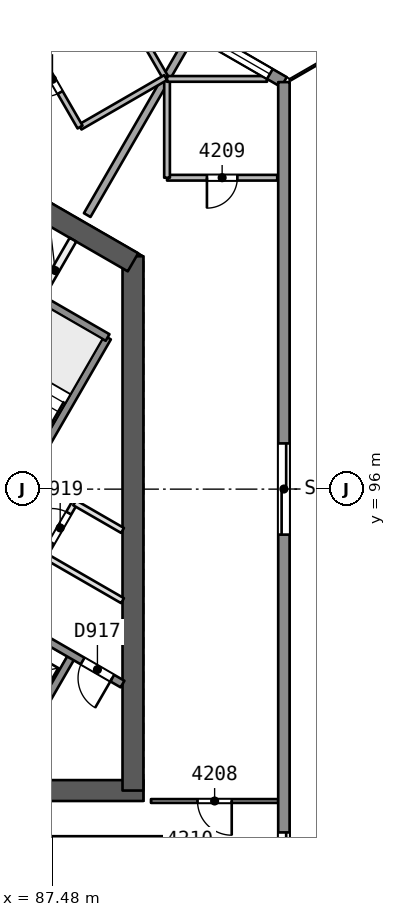
"""IFC4 building model, lengths in metres.
Left out: names, types, materials, properties, quantities, classifications, styles, units other than length and angle.
Written with IfcOpenShell. Run it as: python <this file> out.ifc"""

import sys

from ifc_helpers import new_model, si_unit, direction, frame, frame_2d, origin, place, context, subcontext, project, spatial, rectangle, extrude, element, fill, save


model = new_model("IFC4")
c1 = context("Model", 3, precision=1e-05, world=origin(), true_north=direction((0.0, 1.0)))
c2 = subcontext(c1, "Body", "Model", "MODEL_VIEW")
j1 = project(units=[si_unit("LENGTHUNIT", "METRE"), si_unit("PLANEANGLEUNIT", "RADIAN")], contexts=[c1])
p1 = place(None, origin())
s1 = spatial("IfcSite", under=j1, at=p1, CompositionType="ELEMENT")
p2 = place(p1, origin())
s2 = spatial("IfcBuilding", under=s1, at=p2, CompositionType="ELEMENT")
p3 = place(p2, frame((0.0, 0.0, 174.8)))
s3 = spatial("IfcBuildingStorey", under=s2, at=p3, CompositionType="ELEMENT", Elevation=174.8)
p4 = place(p3, frame((79.659, 88.069, 0.0), z_axis=(0.0, 0.0, 1.0), x_axis=(1.0, 0.0, 0.0)))
e1 = element("IfcWall", 1, at=p4, inside=s3, PredefinedType="SHEAR", context=c2, shape_type="SweptSolid", body=[
    extrude(rectangle(XDim=10.221, YDim=0.55, at=frame_2d((5.111, 0.0))), origin(), (0.0, 0.0, 1.0), 3.7),
])
p5 = place(p4, frame((0.791, 0.0, 0.0)))
e2 = element("IfcOpeningElement", 2, at=p5, cuts=e1, PredefinedType="OPENING", context=c2, shape_type="SweptSolid", body=[
    extrude(rectangle(XDim=1.2, YDim=2.1, at=frame_2d((0.6, 1.05))), frame((0.0, 0.286, 0.0), z_axis=(0.0, -1.0, 0.0), x_axis=(1.0, 0.0, 0.0)), (0.0, 0.0, 1.0), 0.571),
])
p6 = place(p3, frame((89.605, 88.069, 0.0), z_axis=(0.0, 0.0, 1.0), x_axis=(0.0, 1.0, 0.0)))
e3 = element("IfcWall", 3, at=p6, inside=s3, PredefinedType="SHEAR", context=c2, shape_type="SweptSolid", body=[
    extrude(rectangle(XDim=14.058, YDim=0.55, at=frame_2d((7.029, 0.0))), origin(), (0.0, 0.0, 1.0), 3.7),
])
p7 = place(p3, frame((89.605, 101.969, 0.0), z_axis=(0.0, 0.0, 1.0), x_axis=(-0.865997833373, 0.500047750313, 0.0)))
e4 = element("IfcWall", 4, at=p7, inside=s3, PredefinedType="SHEAR", context=c2, shape_type="SweptSolid", body=[
    extrude(rectangle(XDim=3.487, YDim=0.55, at=frame_2d((1.743, 0.0))), origin(), (0.0, 0.0, 1.0), 3.7),
])
p8 = place(p3, frame((93.428, 87.794, 0.0), z_axis=(0.0, 0.0, 1.0), x_axis=(-1.0, 0.0, 0.0)))
e5 = element("IfcWall", 5, at=p8, inside=s3, PredefinedType="PARTITIONING", context=c2, shape_type="SweptSolid", body=[
    extrude(rectangle(XDim=3.349, YDim=0.1, at=frame_2d((1.674, 0.0))), origin(), (0.0, 0.0, 1.0), 3.25),
])
p9 = place(p8, frame((1.224, 0.0, 0.0)))
e6 = element("IfcOpeningElement", 6, at=p9, cuts=e5, PredefinedType="OPENING", context=c2, shape_type="SweptSolid", body=[
    extrude(rectangle(XDim=0.9, YDim=2.1, at=frame_2d((0.45, 1.05))), frame((0.0, 0.061, 0.0), z_axis=(0.0, -1.0, 0.0), x_axis=(1.0, 0.0, 0.0)), (0.0, 0.0, 1.0), 0.121),
])
p10 = place(p3, frame((82.1, 86.768, 0.0), z_axis=(0.0, 0.0, 1.0), x_axis=(1.0, 0.0, 0.0)))
e7 = element("IfcWall", 7, at=p10, inside=s3, PredefinedType="PARTITIONING", context=c2, shape_type="SweptSolid", body=[
    extrude(rectangle(XDim=9.0, YDim=0.2, at=frame_2d((4.5, 0.0))), origin(), (0.0, 0.0, 1.0), 3.25),
])
p11 = place(p3, frame((93.402, 104.194, 0.0), z_axis=(0.0, 0.0, 1.0), x_axis=(-1.0, 0.0, 0.0)))
e8 = element("IfcWall", 8, at=p11, inside=s3, PredefinedType="PARTITIONING", context=c2, shape_type="SweptSolid", body=[
    extrude(rectangle(XDim=2.9, YDim=0.15, at=frame_2d((1.45, 0.0))), origin(), (0.0, 0.0, 1.0), 3.25),
])
p12 = place(p11, frame((1.05, 0.0, 0.0)))
e9 = element("IfcOpeningElement", 9, at=p12, cuts=e8, PredefinedType="OPENING", context=c2, shape_type="SweptSolid", body=[
    extrude(rectangle(XDim=0.8, YDim=2.1, at=frame_2d((0.4, 1.05))), frame((0.0, 0.085, 0.0), z_axis=(0.0, -1.0, 0.0), x_axis=(1.0, 0.0, 0.0)), (0.0, 0.0, 1.0), 0.171),
])
p13 = place(p3, frame((90.501, 104.194, 0.0), z_axis=(0.0, 0.0, 1.0), x_axis=(0.0, 1.0, 0.0)))
e10 = element("IfcWall", 10, at=p13, inside=s3, PredefinedType="PARTITIONING", context=c2, shape_type="SweptSolid", body=[
    extrude(rectangle(XDim=2.6, YDim=0.15, at=frame_2d((1.3, 0.0))), origin(), (0.0, 0.0, 1.0), 3.25),
])
p14 = place(p3, frame((90.501, 106.794, 0.0), z_axis=(0.0, 0.0, 1.0), x_axis=(1.0, 0.0, 0.0)))
e11 = element("IfcWall", 11, at=p14, inside=s3, PredefinedType="PARTITIONING", context=c2, shape_type="SweptSolid", body=[
    extrude(rectangle(XDim=2.632, YDim=0.15, at=frame_2d((1.316, 0.0))), origin(), (0.0, 0.0, 1.0), 3.25),
])
p15 = place(p3, frame((91.135, 107.948, 0.0), z_axis=(0.0, 0.0, 1.0), x_axis=(-0.499980071345, -0.866036909293, 0.0)))
e12 = element("IfcWall", 12, at=p15, inside=s3, PredefinedType="PARTITIONING", context=c2, shape_type="SweptSolid", body=[
    extrude(rectangle(XDim=5.469, YDim=0.2, at=frame_2d((2.734, 0.0))), origin(), (0.0, 0.0, 1.0), 3.25),
])
p16 = place(p3, frame((89.159, 109.089, 0.0), z_axis=(0.0, 0.0, 1.0), x_axis=(0.499981517636, -0.866036074319, 0.0)))
e13 = element("IfcWall", 13, at=p16, inside=s3, PredefinedType="PARTITIONING", context=c2, shape_type="SweptSolid", body=[
    extrude(rectangle(XDim=2.61, YDim=0.15, at=frame_2d((1.305, 0.0))), origin(), (0.0, 0.0, 1.0), 3.25),
])
p17 = place(p3, frame((90.464, 106.828, 0.0), z_axis=(0.0, 0.0, 1.0), x_axis=(-0.866062058628, -0.499936506574, 0.0)))
e14 = element("IfcWall", 14, at=p17, inside=s3, PredefinedType="PARTITIONING", context=c2, shape_type="SweptSolid", body=[
    extrude(rectangle(XDim=2.6, YDim=0.15, at=frame_2d((1.3, 0.0))), origin(), (0.0, 0.0, 1.0), 3.25),
])
p18 = place(p3, frame((88.213, 105.528, 0.0), z_axis=(0.0, 0.0, 1.0), x_axis=(-0.499987231761, 0.866032775405, 0.0)))
e15 = element("IfcWall", 15, at=p18, inside=s3, PredefinedType="PARTITIONING", context=c2, shape_type="SweptSolid", body=[
    extrude(rectangle(XDim=2.9, YDim=0.15, at=frame_2d((1.45, 0.0))), origin(), (0.0, 0.0, 1.0), 3.25),
])
p19 = place(p18, frame((1.05, 0.0, 0.0)))
e16 = element("IfcOpeningElement", 16, at=p19, cuts=e15, PredefinedType="OPENING", context=c2, shape_type="SweptSolid", body=[
    extrude(rectangle(XDim=0.8, YDim=2.1, at=frame_2d((0.4, 1.05))), frame((0.0, 0.085, 0.0), z_axis=(0.0, -1.0, 0.0), x_axis=(1.0, 0.0, 0.0)), (0.0, 0.0, 1.0), 0.171),
])
p20 = place(p3, frame((88.844, 109.443, 0.0), z_axis=(0.0, 0.0, 1.0), x_axis=(0.866027138233, -0.499996995835, 0.0)))
e17 = element("IfcWall", 17, at=p20, inside=s3, PredefinedType="SOLIDWALL", context=c2, shape_type="SweptSolid", body=[
    extrude(rectangle(XDim=5.465, YDim=0.3, at=frame_2d((2.733, 0.0))), origin(), (0.0, 0.0, 1.0), 3.25),
])
p21 = place(p20, frame((3.239, 0.0, 0.9)))
e18 = element("IfcOpeningElement", 18, at=p21, cuts=e17, PredefinedType="OPENING", context=c2, shape_type="SweptSolid", body=[
    extrude(rectangle(XDim=1.8, YDim=1.5, at=frame_2d((0.9, 0.75))), frame((0.0, 0.161, 0.0), z_axis=(0.0, -1.0, 0.0), x_axis=(1.0, 0.0, 0.0)), (0.0, 0.0, 1.0), 0.321),
])
p22 = place(p20, frame((0.432, 0.0, 0.9)))
e19 = element("IfcOpeningElement", 19, at=p22, cuts=e17, PredefinedType="OPENING", context=c2, shape_type="SweptSolid", body=[
    extrude(rectangle(XDim=1.8, YDim=1.5, at=frame_2d((0.9, 0.75))), frame((0.0, 0.161, 0.0), z_axis=(0.0, -1.0, 0.0), x_axis=(1.0, 0.0, 0.0)), (0.0, 0.0, 1.0), 0.321),
])
p23 = place(p3, frame((93.577, 106.71, 0.0), z_axis=(0.0, 0.0, 1.0), x_axis=(0.0, -1.0, 0.0)))
e20 = element("IfcWall", 20, at=p23, inside=s3, PredefinedType="SOLIDWALL", context=c2, shape_type="SweptSolid", body=[
    extrude(rectangle(XDim=53.42, YDim=0.3, at=frame_2d((26.71, 0.0))), origin(), (0.0, 0.0, 1.0), 3.25),
])
p24 = place(p23, frame((31.122, 0.0, 0.0)))
e21 = element("IfcOpeningElement", 21, at=p24, cuts=e20, PredefinedType="OPENING", context=c2, shape_type="SweptSolid", body=[
    extrude(rectangle(XDim=2.4, YDim=2.4, at=frame_2d((1.2, 1.2))), frame((0.0, 0.161, 0.0), z_axis=(0.0, -1.0, 0.0), x_axis=(1.0, 0.0, 0.0)), (0.0, 0.0, 1.0), 0.321),
])
p25 = place(p23, frame((41.52, 0.0, 0.0)))
e22 = element("IfcOpeningElement", 22, at=p25, cuts=e20, PredefinedType="OPENING", context=c2, shape_type="SweptSolid", body=[
    extrude(rectangle(XDim=2.4, YDim=2.4, at=frame_2d((1.2, 1.2))), frame((0.0, 0.161, 0.0), z_axis=(0.0, -1.0, 0.0), x_axis=(1.0, 0.0, 0.0)), (0.0, 0.0, 1.0), 0.321),
])
p26 = place(p23, frame((19.742, 0.0, 0.0)))
e23 = element("IfcOpeningElement", 23, at=p26, cuts=e20, PredefinedType="OPENING", context=c2, shape_type="SweptSolid", body=[
    extrude(rectangle(XDim=2.4, YDim=2.4, at=frame_2d((1.2, 1.2))), frame((0.0, 0.161, 0.0), z_axis=(0.0, -1.0, 0.0), x_axis=(1.0, 0.0, 0.0)), (0.0, 0.0, 1.0), 0.321),
])
p27 = place(p23, frame((9.507, 0.0, 0.0)))
e24 = element("IfcOpeningElement", 24, at=p27, cuts=e20, PredefinedType="OPENING", context=c2, shape_type="SweptSolid", body=[
    extrude(rectangle(XDim=2.4, YDim=2.4, at=frame_2d((1.2, 1.2))), frame((0.0, 0.161, 0.0), z_axis=(0.0, -1.0, 0.0), x_axis=(1.0, 0.0, 0.0)), (0.0, 0.0, 1.0), 0.321),
])
p28 = place(p23, frame((25.354, 0.0, 0.0)))
e25 = element("IfcOpeningElement", 25, at=p28, cuts=e20, PredefinedType="OPENING", context=c2, shape_type="SweptSolid", body=[
    extrude(rectangle(XDim=2.4, YDim=2.4, at=frame_2d((1.2, 1.2))), frame((0.0, 0.161, 0.0), z_axis=(0.0, -1.0, 0.0), x_axis=(1.0, 0.0, 0.0)), (0.0, 0.0, 1.0), 0.321),
])
p29 = place(p3, frame((42.58, 82.733, 0.0), z_axis=(0.0, 0.0, 1.0), x_axis=(0.866025382531, 0.500000036812, 0.0)))
e26 = element("IfcWall", 26, at=p29, inside=s3, PredefinedType="SOLIDWALL", context=c2, shape_type="SweptSolid", body=[
    extrude(rectangle(XDim=53.42, YDim=0.3, at=frame_2d((26.71, 0.0))), origin(), (0.0, 0.0, 1.0), 3.25),
])
p30 = place(p29, frame((30.499, 0.0, 0.0)))
e27 = element("IfcOpeningElement", 27, at=p30, cuts=e26, PredefinedType="OPENING", context=c2, shape_type="SweptSolid", body=[
    extrude(rectangle(XDim=2.4, YDim=2.4, at=frame_2d((1.2, 1.2))), frame((0.0, 0.161, 0.0), z_axis=(0.0, -1.0, 0.0), x_axis=(1.0, 0.0, 0.0)), (0.0, 0.0, 1.0), 0.321),
])
p31 = place(p29, frame((41.52, 0.0, 0.0)))
e28 = element("IfcOpeningElement", 28, at=p31, cuts=e26, PredefinedType="OPENING", context=c2, shape_type="SweptSolid", body=[
    extrude(rectangle(XDim=2.4, YDim=2.4, at=frame_2d((1.2, 1.2))), frame((0.0, 0.161, 0.0), z_axis=(0.0, -1.0, 0.0), x_axis=(1.0, 0.0, 0.0)), (0.0, 0.0, 1.0), 0.321),
])
p32 = place(p29, frame((19.742, 0.0, 0.0)))
e29 = element("IfcOpeningElement", 29, at=p32, cuts=e26, PredefinedType="OPENING", context=c2, shape_type="SweptSolid", body=[
    extrude(rectangle(XDim=2.4, YDim=2.4, at=frame_2d((1.2, 1.2))), frame((0.0, 0.161, 0.0), z_axis=(0.0, -1.0, 0.0), x_axis=(1.0, 0.0, 0.0)), (0.0, 0.0, 1.0), 0.321),
])
p33 = place(p29, frame((9.507, 0.0, 0.0)))
e30 = element("IfcOpeningElement", 30, at=p33, cuts=e26, PredefinedType="OPENING", context=c2, shape_type="SweptSolid", body=[
    extrude(rectangle(XDim=2.4, YDim=2.4, at=frame_2d((1.2, 1.2))), frame((0.0, 0.161, 0.0), z_axis=(0.0, -1.0, 0.0), x_axis=(1.0, 0.0, 0.0)), (0.0, 0.0, 1.0), 0.321),
])
p34 = place(p29, frame((26.512, 0.0, 0.9)))
e31 = element("IfcOpeningElement", 31, at=p34, cuts=e26, PredefinedType="OPENING", context=c2, shape_type="SweptSolid", body=[
    extrude(rectangle(XDim=1.8, YDim=1.5, at=frame_2d((0.9, 0.75))), frame((0.0, 0.161, 0.0), z_axis=(0.0, -1.0, 0.0), x_axis=(1.0, 0.0, 0.0)), (0.0, 0.0, 1.0), 0.321),
])
p35 = place(p29, frame((23.55, 0.0, 0.9)))
e32 = element("IfcOpeningElement", 32, at=p35, cuts=e26, PredefinedType="OPENING", context=c2, shape_type="SweptSolid", body=[
    extrude(rectangle(XDim=1.8, YDim=1.5, at=frame_2d((0.9, 0.75))), frame((0.0, 0.161, 0.0), z_axis=(0.0, -1.0, 0.0), x_axis=(1.0, 0.0, 0.0)), (0.0, 0.0, 1.0), 0.321),
])
p36 = place(p3, frame((86.77, 89.486, 0.0), z_axis=(0.0, 0.0, 1.0), x_axis=(0.499961042966, 0.86604789447, 0.0)))
e33 = element("IfcWall", 33, at=p36, inside=s3, PredefinedType="SOLIDWALL", context=c2, shape_type="SweptSolid", body=[
    extrude(rectangle(XDim=2.48, YDim=0.2, at=frame_2d((1.24, 0.0))), origin(), (0.0, 0.0, 1.0), 3.25),
])
p37 = place(p3, frame((87.271, 94.254, 0.0), z_axis=(0.0, 0.0, 1.0), x_axis=(0.499995408039, 0.866028054938, 0.0)))
e34 = element("IfcWall", 34, at=p37, inside=s3, PredefinedType="PARTITIONING", context=c2, shape_type="SweptSolid", body=[
    extrude(rectangle(XDim=1.6, YDim=0.15, at=frame_2d((0.8, 0.0))), origin(), (0.0, 0.0, 1.0), 3.25),
])
p38 = place(p37, frame((0.387, 0.0, 0.0)))
e35 = element("IfcOpeningElement", 35, at=p38, cuts=e34, PredefinedType="OPENING", context=c2, shape_type="SweptSolid", body=[
    extrude(rectangle(XDim=0.9, YDim=2.1, at=frame_2d((0.45, 1.05))), frame((0.0, 0.085, 0.0), z_axis=(0.0, -1.0, 0.0), x_axis=(1.0, 0.0, 0.0)), (0.0, 0.0, 1.0), 0.171),
])
p39 = place(p3, frame((85.087, 93.321, 0.0), z_axis=(0.0, 0.0, 1.0), x_axis=(0.500019787375, 0.866013979237, 0.0)))
e36 = element("IfcWall", 36, at=p39, inside=s3, PredefinedType="SOLIDWALL", context=c2, shape_type="SweptSolid", body=[
    extrude(rectangle(XDim=7.7, YDim=0.2, at=frame_2d((3.85, 0.0))), origin(), (0.0, 0.0, 1.0), 3.25),
])
p40 = place(p3, frame((87.09, 100.94, 0.0), z_axis=(0.0, 0.0, 1.0), x_axis=(0.499951854219, 0.86605319898, 0.0)))
e37 = element("IfcWall", 37, at=p40, inside=s3, PredefinedType="PARTITIONING", context=c2, shape_type="SweptSolid", body=[
    extrude(rectangle(XDim=1.873, YDim=0.2, at=frame_2d((0.937, 0.0))), origin(), (0.0, 0.0, 1.0), 3.25),
])
p41 = place(p3, frame((89.33, 90.872, 0.0), z_axis=(0.0, 0.0, 1.0), x_axis=(-0.866027589512, 0.49999621419, 0.0)))
e38 = element("IfcWall", 38, at=p41, inside=s3, PredefinedType="SOLIDWALL", context=c2, shape_type="SweptSolid", body=[
    extrude(rectangle(XDim=10.524, YDim=0.2, at=frame_2d((5.262, 0.0))), origin(), (0.0, 0.0, 1.0), 3.25),
])
p42 = place(p41, frame((0.312, 0.0, 0.0)))
e39 = element("IfcOpeningElement", 39, at=p42, cuts=e38, PredefinedType="OPENING", context=c2, shape_type="SweptSolid", body=[
    extrude(rectangle(XDim=0.9, YDim=2.1, at=frame_2d((0.45, 1.05))), frame((0.0, 0.11, 0.0), z_axis=(0.0, -1.0, 0.0), x_axis=(1.0, 0.0, 0.0)), (0.0, 0.0, 1.0), 0.221),
])
p43 = place(p3, frame((89.33, 93.065, 0.0), z_axis=(0.0, 0.0, 1.0), x_axis=(-0.866041951395, 0.499971337603, 0.0)))
e40 = element("IfcWall", 40, at=p43, inside=s3, PredefinedType="PARTITIONING", context=c2, shape_type="SweptSolid", body=[
    extrude(rectangle(XDim=2.378, YDim=0.15, at=frame_2d((1.189, 0.0))), origin(), (0.0, 0.0, 1.0), 3.25),
])
p44 = place(p3, frame((89.33, 94.913, 0.0), z_axis=(0.0, 0.0, 1.0), x_axis=(-0.865981433661, 0.500076150755, 0.0)))
e41 = element("IfcWall", 41, at=p44, inside=s3, PredefinedType="PARTITIONING", context=c2, shape_type="SweptSolid", body=[
    extrude(rectangle(XDim=1.454, YDim=0.15, at=frame_2d((0.727, 0.0))), origin(), (0.0, 0.0, 1.0), 3.25),
])
p45 = place(p3, frame((88.937, 99.99, 0.0), z_axis=(0.0, 0.0, 1.0), x_axis=(-0.866004344652, 0.500036473714, 0.0)))
e42 = element("IfcWall", 42, at=p45, inside=s3, PredefinedType="SOLIDWALL", context=c2, shape_type="SweptSolid", body=[
    extrude(rectangle(XDim=4.15, YDim=0.2, at=frame_2d((2.075, 0.0))), origin(), (0.0, 0.0, 1.0), 3.25),
])
p46 = place(p9, origin())
e43 = element("IfcDoor", 43, at=p46, inside=s3, OperationType="SINGLE_SWING_LEFT", PredefinedType="NOTDEFINED", context=c2, shape_type="SweptSolid", body=[
    extrude(rectangle(XDim=0.9, YDim=2.1, at=frame_2d((0.45, 1.05))), frame((0.0, 0.025, 0.0), z_axis=(0.0, -1.0, 0.0), x_axis=(1.0, 0.0, 0.0)), (0.0, 0.0, 1.0), 0.05),
])
fill(e6, e43)
p47 = place(p12, origin())
e44 = element("IfcDoor", 44, at=p47, inside=s3, OperationType="SINGLE_SWING_RIGHT", PredefinedType="NOTDEFINED", context=c2, shape_type="SweptSolid", body=[
    extrude(rectangle(XDim=0.8, YDim=2.1, at=frame_2d((0.4, 1.05))), frame((0.0, 0.025, 0.0), z_axis=(0.0, -1.0, 0.0), x_axis=(1.0, 0.0, 0.0)), (0.0, 0.0, 1.0), 0.05),
])
fill(e9, e44)
p48 = place(p19, origin())
e45 = element("IfcDoor", 45, at=p48, inside=s3, OperationType="SINGLE_SWING_RIGHT", PredefinedType="NOTDEFINED", context=c2, shape_type="SweptSolid", body=[
    extrude(rectangle(XDim=0.8, YDim=2.1, at=frame_2d((0.4, 1.05))), frame((0.0, 0.025, 0.0), z_axis=(0.0, -1.0, 0.0), x_axis=(1.0, 0.0, 0.0)), (0.0, 0.0, 1.0), 0.05),
])
fill(e16, e45)
p49 = place(p21, origin())
e46 = element("IfcWindow", 46, at=p49, inside=s3, PartitioningType="SINGLE_PANEL", PredefinedType="WINDOW", context=c2, shape_type="SweptSolid", body=[
    extrude(rectangle(XDim=1.8, YDim=1.5, at=frame_2d((0.9, 0.75))), frame((0.0, 0.03, 0.0), z_axis=(0.0, -1.0, 0.0), x_axis=(1.0, 0.0, 0.0)), (0.0, 0.0, 1.0), 0.06),
])
fill(e18, e46)
p50 = place(p26, origin())
e47 = element("IfcDoor", 47, at=p50, inside=s3, OperationType="SLIDING_TO_LEFT", PredefinedType="NOTDEFINED", context=c2, shape_type="SweptSolid", body=[
    extrude(rectangle(XDim=2.4, YDim=2.4, at=frame_2d((1.2, 1.2))), frame((0.0, 0.025, 0.0), z_axis=(0.0, -1.0, 0.0), x_axis=(1.0, 0.0, 0.0)), (0.0, 0.0, 1.0), 0.05),
])
fill(e23, e47)
p51 = place(p27, origin())
e48 = element("IfcDoor", 48, at=p51, inside=s3, OperationType="SLIDING_TO_RIGHT", PredefinedType="NOTDEFINED", context=c2, shape_type="SweptSolid", body=[
    extrude(rectangle(XDim=2.4, YDim=2.4, at=frame_2d((1.2, 1.2))), frame((0.0, 0.025, 0.0), z_axis=(0.0, -1.0, 0.0), x_axis=(1.0, 0.0, 0.0)), (0.0, 0.0, 1.0), 0.05),
])
fill(e24, e48)
p52 = place(p42, origin())
e49 = element("IfcDoor", 49, at=p52, inside=s3, OperationType="SINGLE_SWING_LEFT", PredefinedType="NOTDEFINED", context=c2, shape_type="SweptSolid", body=[
    extrude(rectangle(XDim=0.9, YDim=2.1, at=frame_2d((0.45, 1.05))), frame((0.0, 0.025, 0.0), z_axis=(0.0, -1.0, 0.0), x_axis=(1.0, 0.0, 0.0)), (0.0, 0.0, 1.0), 0.05),
])
fill(e39, e49)
p53 = place(p38, origin())
e50 = element("IfcDoor", 50, at=p53, inside=s3, OperationType="SINGLE_SWING_LEFT", PredefinedType="NOTDEFINED", context=c2, shape_type="SweptSolid", body=[
    extrude(rectangle(XDim=0.9, YDim=2.1, at=frame_2d((0.45, 1.05))), frame((0.0, 0.025, 0.0), z_axis=(0.0, -1.0, 0.0), x_axis=(1.0, 0.0, 0.0)), (0.0, 0.0, 1.0), 0.05),
])
fill(e35, e50)
save(model, sys.argv[1])
